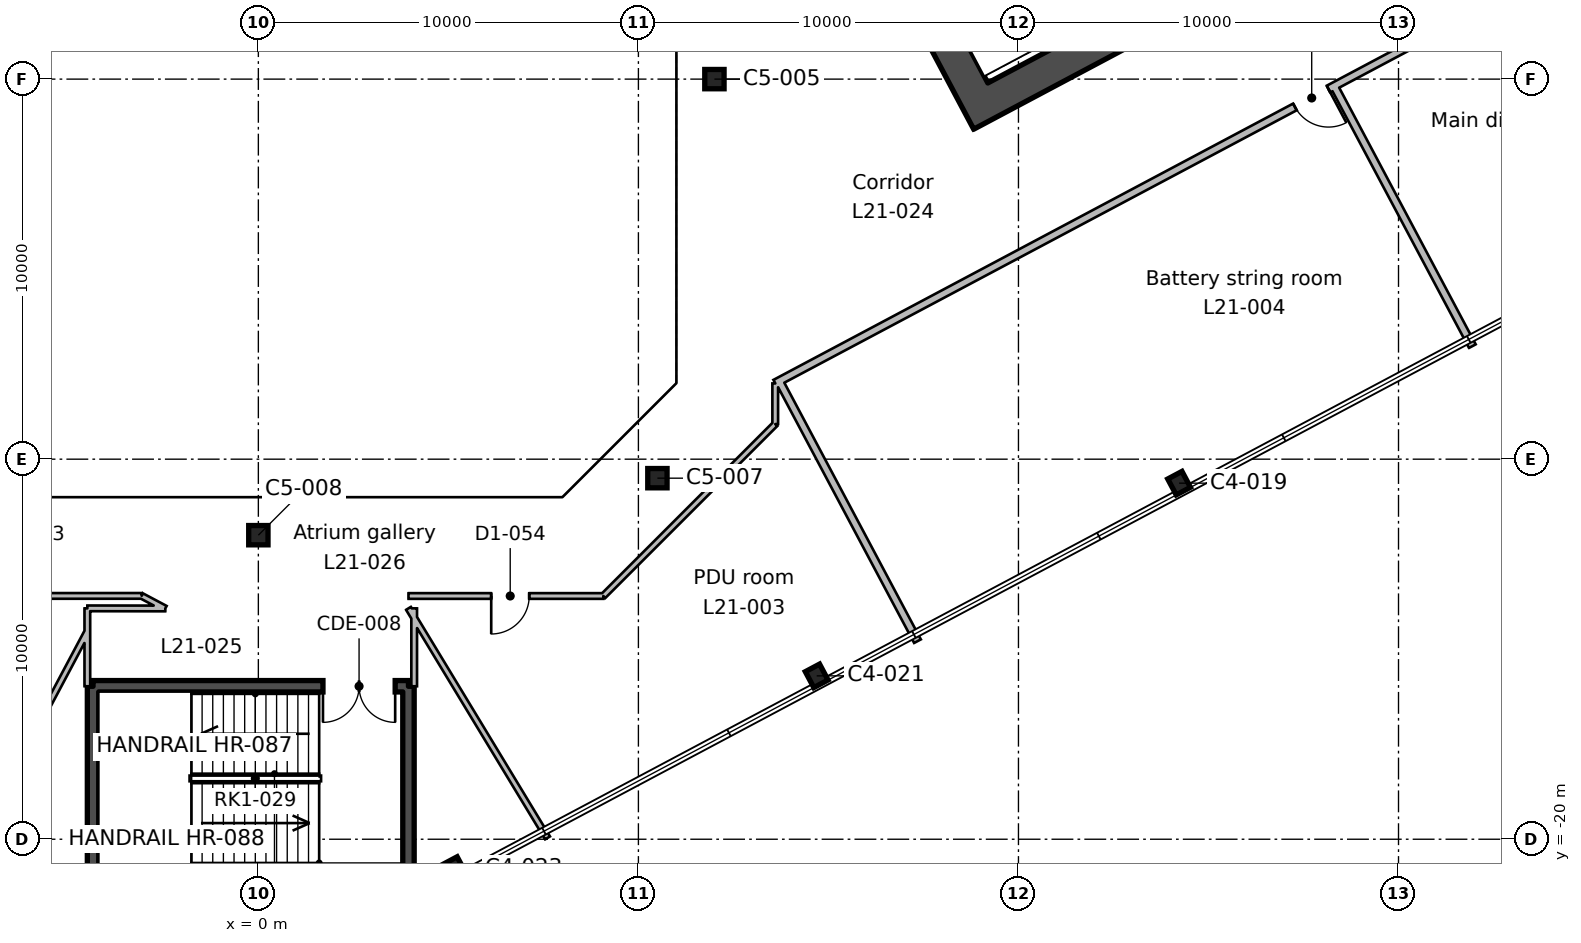
"""IFC4 building model, lengths in metres.
Left out: names, types, materials, properties, quantities, classifications, styles, units other than length and angle.
Written with IfcOpenShell. Run it as: python <this file> out.ifc"""

import sys

from ifc_helpers import new_model, si_unit, direction, frame, frame_2d, origin, origin_2d, place, context, subcontext, project, spatial, rectangle, hollow_rectangle, i_section, extrude, element, fill, save


model = new_model("IFC4")
c1 = context("Model", 3, precision=1e-05, world=origin(), true_north=direction((0.0, 1.0)))
c2 = subcontext(c1, "Body", "Model", "MODEL_VIEW")
j1 = project(units=[si_unit("LENGTHUNIT", "METRE"), si_unit("PLANEANGLEUNIT", "RADIAN")], contexts=[c1])
p1 = place(None, origin())
s1 = spatial("IfcSite", under=j1, at=p1, CompositionType="ELEMENT")
p2 = place(p1, origin())
s2 = spatial("IfcBuilding", under=s1, at=p2, CompositionType="ELEMENT")
p3 = place(p2, frame((0.0, 0.0, 107.6)))
s3 = spatial("IfcBuildingStorey", under=s2, at=p3, CompositionType="ELEMENT", Elevation=107.6)
for number, where, z_axis, x_axis in (
    (1, (5.155, -20.771, 0.0), (0.0, 0.0, 1.0), (0.883, 0.469, 0.0)),
    (2, (14.691, -15.701, 0.0), (0.0, 0.0, 1.0), (0.883, 0.469, 0.0)),
):
    element("IfcColumn", number, at=place(p3, frame(where, z_axis=z_axis, x_axis=x_axis)), inside=s3, PredefinedType="COLUMN", context=c2, shape_type="SweptSolid", body=[
        extrude(i_section(OverallWidth=0.424, OverallDepth=0.475, WebThickness=0.048, FlangeThickness=0.077, FilletRadius=0.015, at=origin_2d()), origin(), (0.0, 0.0, 1.0), 4.6),
    ])
p4 = place(p3, frame((0.0, -12.0, 0.0), z_axis=(0.0, 0.0, 1.0), x_axis=(1.0, 0.0, 0.0)))
e3 = element("IfcColumn", 3, at=p4, inside=s3, PredefinedType="COLUMN", context=c2, shape_type="SweptSolid", body=[
    extrude(hollow_rectangle(XDim=0.508, YDim=0.508, WallThickness=0.021, InnerFilletRadius=0.01, OuterFilletRadius=0.031, at=origin_2d()), origin(), (0.0, 0.0, 1.0), 4.6),
])
p5 = place(p3, frame((24.227, -10.631, 0.0), z_axis=(0.0, 0.0, 1.0), x_axis=(0.882947592859, 0.469471562786, 0.0)))
e4 = element("IfcColumn", 4, at=p5, inside=s3, PredefinedType="COLUMN", context=c2, shape_type="SweptSolid", body=[
    extrude(i_section(OverallWidth=0.424, OverallDepth=0.475, WebThickness=0.048, FlangeThickness=0.077, FilletRadius=0.015, at=origin_2d()), origin(), (0.0, 0.0, 1.0), 4.6),
])
for number, where, z_axis, x_axis in (
    (5, (10.5, -10.5, 0.0), (0.0, 0.0, 1.0), (1.0, 0.0, 0.0)),
    (6, (12.0, 0.0, 0.0), (0.0, 0.0, 1.0), (1.0, 0.0, 0.0)),
):
    element("IfcColumn", number, at=place(p3, frame(where, z_axis=z_axis, x_axis=x_axis)), inside=s3, PredefinedType="COLUMN", context=c2, shape_type="SweptSolid", body=[
        extrude(hollow_rectangle(XDim=0.508, YDim=0.508, WallThickness=0.021, InnerFilletRadius=0.01, OuterFilletRadius=0.031, at=origin_2d()), origin(), (0.0, 0.0, 1.0), 4.6),
    ])
p6 = place(p3, frame((19.219, -1.107, 0.0), z_axis=(0.0, 0.0, 1.0), x_axis=(-0.46947084998, 0.882947971864, 0.0)))
e7 = element("IfcWall", 7, at=p6, inside=s3, PredefinedType="SHEAR", context=c2, shape_type="SweptSolid", body=[
    extrude(rectangle(XDim=20.0, YDim=0.9, at=frame_2d((10.0, 0.0))), origin(), (0.0, 0.0, 1.0), 4.6),
])
p7 = place(p6, frame((7.0, 0.0, 0.0)))
e8 = element("IfcOpeningElement", 8, at=p7, cuts=e7, PredefinedType="OPENING", context=c2, shape_type="SweptSolid", body=[
    extrude(rectangle(XDim=2.4, YDim=2.4, at=frame_2d((1.2, 1.2))), frame((0.0, 0.46, 0.0), z_axis=(0.0, -1.0, 0.0), x_axis=(1.0, 0.0, 0.0)), (0.0, 0.0, 1.0), 0.92),
])
p8 = place(p3, frame((19.405, -0.498, 0.0), z_axis=(0.0, 0.0, 1.0), x_axis=(0.88294509198, 0.469476266226, 0.0)))
e9 = element("IfcWall", 9, at=p8, inside=s3, PredefinedType="SHEAR", context=c2, shape_type="SweptSolid", body=[
    extrude(rectangle(XDim=20.2, YDim=0.9, at=frame_2d((10.1, 0.0))), origin(), (0.0, 0.0, 1.0), 4.6),
])
for number, where, z_axis, x_axis in (
    (10, (3.95, -15.975, 0.0), (0.0, 0.0, 1.0), (0.0, -1.0, 0.0)),
    (11, (-4.35, -20.825, 0.0), (0.0, 0.0, 1.0), (0.0, 1.0, 0.0)),
):
    element("IfcWall", number, at=place(p3, frame(where, z_axis=z_axis, x_axis=x_axis)), inside=s3, PredefinedType="SHEAR", context=c2, shape_type="SweptSolid", body=[
        extrude(rectangle(XDim=4.85, YDim=0.3, at=frame_2d((2.425, 0.0))), origin(), (0.0, 0.0, 1.0), 4.6),
    ])
p9 = place(p3, frame((-4.35, -15.975, 0.0), z_axis=(0.0, 0.0, 1.0), x_axis=(1.0, 0.0, 0.0)))
e12 = element("IfcWall", 12, at=p9, inside=s3, PredefinedType="SHEAR", context=c2, shape_type="SweptSolid", body=[
    extrude(rectangle(XDim=8.3, YDim=0.3, at=frame_2d((4.15, 0.0))), origin(), (0.0, 0.0, 1.0), 4.6),
])
p10 = place(p9, frame((6.05, 0.0, 0.0)))
e13 = element("IfcOpeningElement", 13, at=p10, cuts=e12, PredefinedType="OPENING", context=c2, shape_type="SweptSolid", body=[
    extrude(rectangle(XDim=1.9, YDim=2.1, at=frame_2d((0.95, 1.05))), frame((0.0, 0.16, 0.0), z_axis=(0.0, -1.0, 0.0), x_axis=(1.0, 0.0, 0.0)), (0.0, 0.0, 1.0), 0.32),
])
p11 = place(p3, frame((-9.077, -13.6, 0.0), z_axis=(0.0, 0.0, 1.0), x_axis=(0.999999860368, 0.000528455211, 0.0)))
e14 = element("IfcWall", 14, at=p11, inside=s3, PredefinedType="PARTITIONING", context=c2, shape_type="SweptSolid", body=[
    extrude(rectangle(XDim=6.006, YDim=0.15, at=frame_2d((3.003, 0.0))), origin(), (0.0, 0.0, 1.0), 4.15),
])
p12 = place(p11, frame((2.55, 0.0, 0.0)))
e15 = element("IfcOpeningElement", 15, at=p12, cuts=e14, PredefinedType="OPENING", context=c2, shape_type="SweptSolid", body=[
    extrude(rectangle(XDim=1.0, YDim=2.1, at=frame_2d((0.5, 1.05))), frame((0.0, 0.085, 0.0), z_axis=(0.0, -1.0, 0.0), x_axis=(1.0, 0.0, 0.0)), (0.0, 0.0, 1.0), 0.17),
])
p13 = place(p3, frame((-3.071, -13.597, 0.0), z_axis=(0.0, 0.0, 1.0), x_axis=(0.883079874776, -0.469222692083, 0.0)))
e16 = element("IfcWall", 16, at=p13, inside=s3, PredefinedType="PARTITIONING", context=c2, shape_type="SweptSolid", body=[
    extrude(rectangle(XDim=0.706, YDim=0.15, at=frame_2d((0.353, 0.0))), origin(), (0.0, 0.0, 1.0), 4.15),
])
p14 = place(p3, frame((-2.448, -13.928, 0.0), z_axis=(0.0, 0.0, 1.0), x_axis=(-0.999998980807, 0.001427720139, 0.0)))
e17 = element("IfcWall", 17, at=p14, inside=s3, PredefinedType="PARTITIONING", context=c2, shape_type="SweptSolid", body=[
    extrude(rectangle(XDim=2.052, YDim=0.15, at=frame_2d((1.026, 0.0))), origin(), (0.0, 0.0, 1.0), 4.15),
])
p15 = place(p3, frame((-4.5, -13.925, 0.0), z_axis=(0.0, 0.0, 1.0), x_axis=(0.0, -1.0, 0.0)))
e18 = element("IfcWall", 18, at=p15, inside=s3, PredefinedType="PARTITIONING", context=c2, shape_type="SweptSolid", body=[
    extrude(rectangle(XDim=2.05, YDim=0.15, at=frame_2d((1.025, 0.0))), origin(), (0.0, 0.0, 1.0), 4.15),
])
p16 = place(p3, frame((-4.5, -14.533, 0.0), z_axis=(0.0, 0.0, 1.0), x_axis=(-0.469522352041, -0.882920585859, 0.0)))
e19 = element("IfcWall", 19, at=p16, inside=s3, PredefinedType="PARTITIONING", context=c2, shape_type="SweptSolid", body=[
    extrude(rectangle(XDim=6.255, YDim=0.15, at=frame_2d((3.128, 0.0))), origin(), (0.0, 0.0, 1.0), 4.15),
])
p17 = place(p3, frame((4.1, -13.925, 0.0), z_axis=(0.0, 0.0, 1.0), x_axis=(0.0, -1.0, 0.0)))
e20 = element("IfcWall", 20, at=p17, inside=s3, PredefinedType="PARTITIONING", context=c2, shape_type="SweptSolid", body=[
    extrude(rectangle(XDim=2.05, YDim=0.15, at=frame_2d((1.025, 0.0))), origin(), (0.0, 0.0, 1.0), 4.15),
])
p18 = place(p3, frame((13.6, -8.007, 0.0), z_axis=(0.0, 0.0, 1.0), x_axis=(0.0, -1.0, 0.0)))
e21 = element("IfcWall", 21, at=p18, inside=s3, PredefinedType="PARTITIONING", context=c2, shape_type="SweptSolid", body=[
    extrude(rectangle(XDim=1.07, YDim=0.15, at=frame_2d((0.535, 0.0))), origin(), (0.0, 0.0, 1.0), 4.15),
])
p19 = place(p3, frame((13.6, -9.077, 0.0), z_axis=(0.0, 0.0, 1.0), x_axis=(-0.707106781187, -0.707106781187, 0.0)))
e22 = element("IfcWall", 22, at=p19, inside=s3, PredefinedType="PARTITIONING", context=c2, shape_type="SweptSolid", body=[
    extrude(rectangle(XDim=6.397, YDim=0.15, at=frame_2d((3.198, 0.0))), origin(), (0.0, 0.0, 1.0), 4.15),
])
p20 = place(p3, frame((9.077, -13.6, 0.0), z_axis=(0.0, 0.0, 1.0), x_axis=(-1.0, 0.0, 0.0)))
e23 = element("IfcWall", 23, at=p20, inside=s3, PredefinedType="PARTITIONING", context=c2, shape_type="SweptSolid", body=[
    extrude(rectangle(XDim=5.127, YDim=0.15, at=frame_2d((2.563, 0.0))), origin(), (0.0, 0.0, 1.0), 4.15),
])
p21 = place(p20, frame((1.95, 0.0, 0.0)))
e24 = element("IfcOpeningElement", 24, at=p21, cuts=e23, PredefinedType="OPENING", context=c2, shape_type="SweptSolid", body=[
    extrude(rectangle(XDim=1.0, YDim=2.1, at=frame_2d((0.5, 1.05))), frame((0.0, 0.085, 0.0), z_axis=(0.0, -1.0, 0.0), x_axis=(1.0, 0.0, 0.0)), (0.0, 0.0, 1.0), 0.17),
])
p22 = place(p3, frame((7.609, -19.965, 0.0), z_axis=(0.0, 0.0, 1.0), x_axis=(-0.518126246201, 0.855304152333, 0.0)))
e25 = element("IfcWall", 25, at=p22, inside=s3, PredefinedType="PARTITIONING", context=c2, shape_type="SweptSolid", body=[
    extrude(rectangle(XDim=7.062, YDim=0.15, at=frame_2d((3.531, 0.0))), origin(), (0.0, 0.0, 1.0), 4.15),
])
p23 = place(p3, frame((13.704, -7.946, 0.0), z_axis=(0.0, 0.0, 1.0), x_axis=(0.469513711464, -0.882925180719, 0.0)))
e26 = element("IfcWall", 26, at=p23, inside=s3, PredefinedType="PARTITIONING", context=c2, shape_type="SweptSolid", body=[
    extrude(rectangle(XDim=7.75, YDim=0.2, at=frame_2d((3.875, 0.0))), origin(), (0.0, 0.0, 1.0), 4.15),
])
p24 = place(p3, frame((62.372, 17.93, 0.0), z_axis=(0.0, 0.0, 1.0), x_axis=(-0.88295234377, -0.469462627513, 0.0)))
e27 = element("IfcWall", 27, at=p24, inside=s3, PredefinedType="PARTITIONING", context=c2, shape_type="SweptSolid", body=[
    extrude(rectangle(XDim=55.237, YDim=0.2, at=frame_2d((27.619, 0.0))), origin(), (0.0, 0.0, 1.0), 4.15),
])
p25 = place(p24, frame((38.75, 0.0, 0.0)))
e28 = element("IfcOpeningElement", 28, at=p25, cuts=e27, PredefinedType="OPENING", context=c2, shape_type="SweptSolid", body=[
    extrude(rectangle(XDim=1.0, YDim=2.1, at=frame_2d((0.5, 1.05))), frame((0.0, 0.11, 0.0), z_axis=(0.0, -1.0, 0.0), x_axis=(1.0, 0.0, 0.0)), (0.0, 0.0, 1.0), 0.22),
])
p26 = place(p24, frame((27.15, 0.0, 0.0)))
e29 = element("IfcOpeningElement", 29, at=p26, cuts=e27, PredefinedType="OPENING", context=c2, shape_type="SweptSolid", body=[
    extrude(rectangle(XDim=1.0, YDim=2.1, at=frame_2d((0.5, 1.05))), frame((0.0, 0.11, 0.0), z_axis=(0.0, -1.0, 0.0), x_axis=(1.0, 0.0, 0.0)), (0.0, 0.0, 1.0), 0.22),
])
p27 = place(p24, frame((20.85, 0.0, 0.0)))
e30 = element("IfcOpeningElement", 30, at=p27, cuts=e27, PredefinedType="OPENING", context=c2, shape_type="SweptSolid", body=[
    extrude(rectangle(XDim=1.0, YDim=2.1, at=frame_2d((0.5, 1.05))), frame((0.0, 0.11, 0.0), z_axis=(0.0, -1.0, 0.0), x_axis=(1.0, 0.0, 0.0)), (0.0, 0.0, 1.0), 0.22),
])
p28 = place(p3, frame((28.304, -0.184, 0.0), z_axis=(0.0, 0.0, 1.0), x_axis=(0.469603568342, -0.882877391601, 0.0)))
e31 = element("IfcWall", 31, at=p28, inside=s3, PredefinedType="PARTITIONING", context=c2, shape_type="SweptSolid", body=[
    extrude(rectangle(XDim=7.75, YDim=0.2, at=frame_2d((3.875, 0.0))), origin(), (0.0, 0.0, 1.0), 4.15),
])
p29 = place(p10, frame((1.9, 0.0, 0.0), z_axis=(0.0, 0.0, 1.0), x_axis=(-1.0, 0.0, 0.0)))
e32 = element("IfcDoor", 32, at=p29, inside=s3, OperationType="DOUBLE_DOOR_SINGLE_SWING", PredefinedType="DOOR", context=c2, shape_type="SweptSolid", body=[
    extrude(rectangle(XDim=1.9, YDim=2.1, at=frame_2d((0.95, 1.05))), frame((0.0, 0.025, 0.0), z_axis=(0.0, -1.0, 0.0), x_axis=(1.0, 0.0, 0.0)), (0.0, 0.0, 1.0), 0.05),
])
fill(e13, e32)
p30 = place(p21, origin())
e33 = element("IfcDoor", 33, at=p30, inside=s3, OperationType="SINGLE_SWING_RIGHT", PredefinedType="DOOR", context=c2, shape_type="SweptSolid", body=[
    extrude(rectangle(XDim=1.0, YDim=2.1, at=frame_2d((0.5, 1.05))), frame((0.0, 0.025, 0.0), z_axis=(0.0, -1.0, 0.0), x_axis=(1.0, 0.0, 0.0)), (0.0, 0.0, 1.0), 0.05),
])
fill(e24, e33)
p31 = place(p25, origin())
e34 = element("IfcDoor", 34, at=p31, inside=s3, OperationType="SINGLE_SWING_LEFT", PredefinedType="DOOR", context=c2, shape_type="SweptSolid", body=[
    extrude(rectangle(XDim=1.0, YDim=2.1, at=frame_2d((0.5, 1.05))), frame((0.0, 0.025, 0.0), z_axis=(0.0, -1.0, 0.0), x_axis=(1.0, 0.0, 0.0)), (0.0, 0.0, 1.0), 0.05),
])
fill(e28, e34)
save(model, sys.argv[1])
